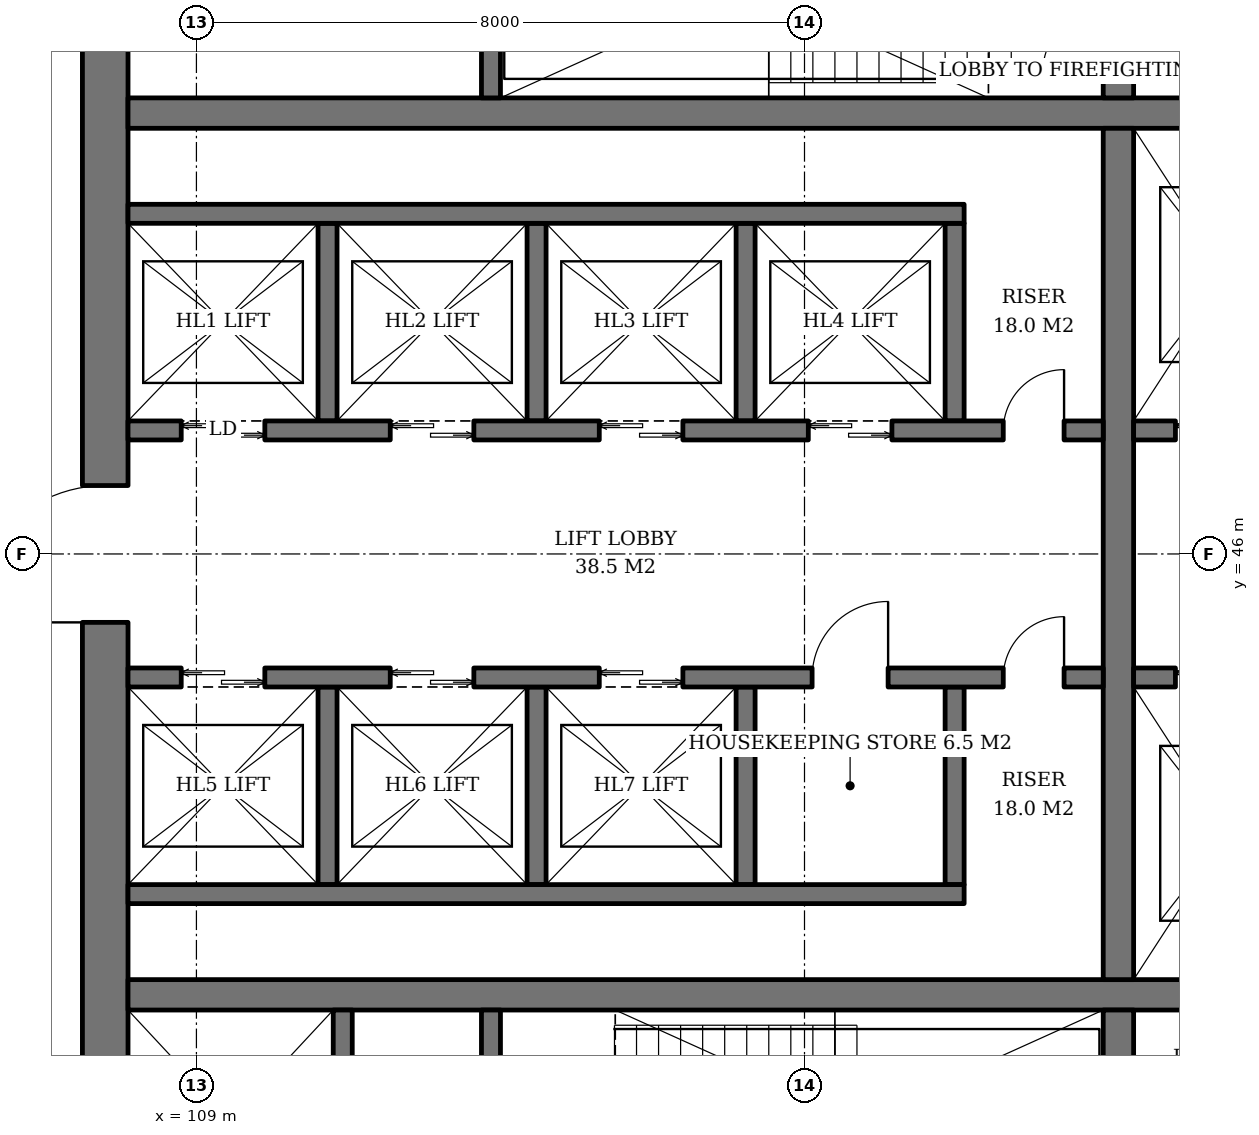
"""IFC4 building model, lengths in metres.
Left out: names, types, materials, properties, quantities, classifications, styles, units other than length and angle.
Written with IfcOpenShell. Run it as: python <this file> out.ifc"""

import sys

from ifc_helpers import new_model, si_unit, direction, frame, frame_2d, origin, place, context, subcontext, project, spatial, rectangle, extrude, element, fill, save


model = new_model("IFC4")
c1 = context("Model", 3, precision=1e-05, world=origin(), true_north=direction((0.0, 1.0)))
c2 = subcontext(c1, "Body", "Model", "MODEL_VIEW")
j1 = project(units=[si_unit("LENGTHUNIT", "METRE"), si_unit("PLANEANGLEUNIT", "RADIAN")], contexts=[c1])
p1 = place(None, origin())
s1 = spatial("IfcSite", under=j1, at=p1, CompositionType="ELEMENT")
p2 = place(p1, origin())
s2 = spatial("IfcBuilding", under=s1, at=p2, CompositionType="ELEMENT")
p3 = place(p2, frame((0.0, 0.0, 89.4)))
s3 = spatial("IfcBuildingStorey", under=s2, at=p3, CompositionType="ELEMENT", Elevation=89.4)
p4 = place(p3, frame((107.8, 37.1, 0.0), z_axis=(0.0, 0.0, 1.0), x_axis=(0.0, 1.0, 0.0)))
e1 = element("IfcWall", 1, at=p4, inside=s3, PredefinedType="SHEAR", context=c2, shape_type="SweptSolid", body=[
    extrude(rectangle(XDim=17.8, YDim=0.6, at=frame_2d((8.9, 0.0))), origin(), (0.0, 0.0, 1.0), 3.8),
])
p5 = place(p4, frame((8.0, 0.0, 0.0)))
e2 = element("IfcOpeningElement", 2, at=p5, cuts=e1, PredefinedType="OPENING", context=c2, shape_type="SweptSolid", body=[
    extrude(rectangle(XDim=1.8, YDim=2.4, at=frame_2d((0.9, 1.2))), frame((0.0, 0.31, 0.0), z_axis=(0.0, -1.0, 0.0), x_axis=(1.0, 0.0, 0.0)), (0.0, 0.0, 1.0), 0.62),
])
for number, where, z_axis, x_axis in (
    (3, (108.1, 40.2, 0.0), (0.0, 0.0, 1.0), (1.0, 0.0, 0.0)),
    (4, (108.1, 51.8, 0.0), (0.0, 0.0, 1.0), (1.0, 0.0, 0.0)),
):
    element("IfcWall", number, at=place(p3, frame(where, z_axis=z_axis, x_axis=x_axis)), inside=s3, PredefinedType="SHEAR", context=c2, shape_type="SweptSolid", body=[
        extrude(rectangle(XDim=17.8, YDim=0.4, at=frame_2d((8.9, 0.0))), origin(), (0.0, 0.0, 1.0), 3.8),
    ])
p6 = place(p3, frame((121.13, 37.1, 0.0), z_axis=(0.0, 0.0, 1.0), x_axis=(0.0, 1.0, 0.0)))
e5 = element("IfcWall", 5, at=p6, inside=s3, PredefinedType="SHEAR", context=c2, shape_type="SweptSolid", body=[
    extrude(rectangle(XDim=2.9, YDim=0.4, at=frame_2d((1.45, 0.0))), origin(), (0.0, 0.0, 1.0), 3.8),
])
p7 = place(p3, frame((121.13, 40.4, 0.0), z_axis=(0.0, 0.0, 1.0), x_axis=(0.0, 1.0, 0.0)))
e6 = element("IfcWall", 6, at=p7, inside=s3, PredefinedType="SHEAR", context=c2, shape_type="SweptSolid", body=[
    extrude(rectangle(XDim=11.2, YDim=0.4, at=frame_2d((5.6, 0.0))), origin(), (0.0, 0.0, 1.0), 3.8),
])
p8 = place(p3, frame((121.13, 52.0, 0.0), z_axis=(0.0, 0.0, 1.0), x_axis=(0.0, 1.0, 0.0)))
e7 = element("IfcWall", 7, at=p8, inside=s3, PredefinedType="SHEAR", context=c2, shape_type="SweptSolid", body=[
    extrude(rectangle(XDim=2.9, YDim=0.4, at=frame_2d((1.45, 0.0))), origin(), (0.0, 0.0, 1.0), 3.8),
])
p9 = place(p8, frame((0.3, 0.0, 0.0)))
e8 = element("IfcOpeningElement", 8, at=p9, cuts=e7, PredefinedType="OPENING", context=c2, shape_type="SweptSolid", body=[
    extrude(rectangle(XDim=1.0, YDim=2.1, at=frame_2d((0.5, 1.05))), frame((0.0, 0.21, 0.0), z_axis=(0.0, -1.0, 0.0), x_axis=(1.0, 0.0, 0.0)), (0.0, 0.0, 1.0), 0.42),
])
p10 = place(p3, frame((110.925, 37.1, 0.0), z_axis=(0.0, 0.0, 1.0), x_axis=(0.0, 1.0, 0.0)))
e9 = element("IfcWall", 9, at=p10, inside=s3, PredefinedType="SHEAR", context=c2, shape_type="SweptSolid", body=[
    extrude(rectangle(XDim=2.9, YDim=0.25, at=frame_2d((1.45, 0.0))), origin(), (0.0, 0.0, 1.0), 3.8),
])
p11 = place(p10, frame((0.8, 0.0, 0.0)))
e10 = element("IfcOpeningElement", 10, at=p11, cuts=e9, PredefinedType="OPENING", context=c2, shape_type="SweptSolid", body=[
    extrude(rectangle(XDim=1.3, YDim=2.2, at=frame_2d((0.65, 1.1))), frame((0.0, 0.135, 0.0), z_axis=(0.0, -1.0, 0.0), x_axis=(1.0, 0.0, 0.0)), (0.0, 0.0, 1.0), 0.27),
])
p12 = place(p3, frame((112.875, 37.1, 0.0), z_axis=(0.0, 0.0, 1.0), x_axis=(0.0, 1.0, 0.0)))
e11 = element("IfcWall", 11, at=p12, inside=s3, PredefinedType="SHEAR", context=c2, shape_type="SweptSolid", body=[
    extrude(rectangle(XDim=2.9, YDim=0.25, at=frame_2d((1.45, 0.0))), origin(), (0.0, 0.0, 1.0), 3.8),
])
p13 = place(p12, frame((0.75, 0.0, 0.0)))
e12 = element("IfcOpeningElement", 12, at=p13, cuts=e11, PredefinedType="OPENING", context=c2, shape_type="SweptSolid", body=[
    extrude(rectangle(XDim=1.2, YDim=2.1, at=frame_2d((0.6, 1.05))), frame((0.0, 0.135, 0.0), z_axis=(0.0, -1.0, 0.0), x_axis=(1.0, 0.0, 0.0)), (0.0, 0.0, 1.0), 0.27),
])
p14 = place(p3, frame((112.875, 52.0, 0.0), z_axis=(0.0, 0.0, 1.0), x_axis=(0.0, 1.0, 0.0)))
e13 = element("IfcWall", 13, at=p14, inside=s3, PredefinedType="SHEAR", context=c2, shape_type="SweptSolid", body=[
    extrude(rectangle(XDim=2.9, YDim=0.25, at=frame_2d((1.45, 0.0))), origin(), (0.0, 0.0, 1.0), 3.8),
])
for number, where, z_axis, x_axis in (
    (14, (110.725, 47.75, 0.0), (0.0, 0.0, 1.0), (0.0, 1.0, 0.0)),
    (15, (113.475, 47.75, 0.0), (0.0, 0.0, 1.0), (0.0, 1.0, 0.0)),
    (16, (116.225, 47.75, 0.0), (0.0, 0.0, 1.0), (0.0, 1.0, 0.0)),
    (17, (118.975, 47.75, 0.0), (0.0, 0.0, 1.0), (0.0, 1.0, 0.0)),
):
    element("IfcWall", number, at=place(p3, frame(where, z_axis=z_axis, x_axis=x_axis)), inside=s3, PredefinedType="SHEAR", context=c2, shape_type="SweptSolid", body=[
        extrude(rectangle(XDim=2.6, YDim=0.25, at=frame_2d((1.3, 0.0))), origin(), (0.0, 0.0, 1.0), 3.8),
    ])
p15 = place(p3, frame((108.1, 50.475, 0.0), z_axis=(0.0, 0.0, 1.0), x_axis=(1.0, 0.0, 0.0)))
e18 = element("IfcWall", 18, at=p15, inside=s3, PredefinedType="SHEAR", context=c2, shape_type="SweptSolid", body=[
    extrude(rectangle(XDim=11.0, YDim=0.25, at=frame_2d((5.5, 0.0))), origin(), (0.0, 0.0, 1.0), 3.8),
])
p16 = place(p3, frame((108.1, 47.625, 0.0), z_axis=(0.0, 0.0, 1.0), x_axis=(1.0, 0.0, 0.0)))
e19 = element("IfcWall", 19, at=p16, inside=s3, PredefinedType="SHEAR", context=c2, shape_type="SweptSolid", body=[
    extrude(rectangle(XDim=12.83, YDim=0.25, at=frame_2d((6.415, 0.0))), origin(), (0.0, 0.0, 1.0), 3.8),
])
p17 = place(p16, frame((0.7, 0.0, 0.0)))
e20 = element("IfcOpeningElement", 20, at=p17, cuts=e19, PredefinedType="OPENING", context=c2, shape_type="SweptSolid", body=[
    extrude(rectangle(XDim=1.1, YDim=2.2, at=frame_2d((0.55, 1.1))), frame((0.0, 0.135, 0.0), z_axis=(0.0, -1.0, 0.0), x_axis=(1.0, 0.0, 0.0)), (0.0, 0.0, 1.0), 0.27),
])
p18 = place(p16, frame((3.45, 0.0, 0.0)))
e21 = element("IfcOpeningElement", 21, at=p18, cuts=e19, PredefinedType="OPENING", context=c2, shape_type="SweptSolid", body=[
    extrude(rectangle(XDim=1.1, YDim=2.2, at=frame_2d((0.55, 1.1))), frame((0.0, 0.135, 0.0), z_axis=(0.0, -1.0, 0.0), x_axis=(1.0, 0.0, 0.0)), (0.0, 0.0, 1.0), 0.27),
])
p19 = place(p16, frame((6.2, 0.0, 0.0)))
e22 = element("IfcOpeningElement", 22, at=p19, cuts=e19, PredefinedType="OPENING", context=c2, shape_type="SweptSolid", body=[
    extrude(rectangle(XDim=1.1, YDim=2.2, at=frame_2d((0.55, 1.1))), frame((0.0, 0.135, 0.0), z_axis=(0.0, -1.0, 0.0), x_axis=(1.0, 0.0, 0.0)), (0.0, 0.0, 1.0), 0.27),
])
p20 = place(p16, frame((8.95, 0.0, 0.0)))
e23 = element("IfcOpeningElement", 23, at=p20, cuts=e19, PredefinedType="OPENING", context=c2, shape_type="SweptSolid", body=[
    extrude(rectangle(XDim=1.1, YDim=2.2, at=frame_2d((0.55, 1.1))), frame((0.0, 0.135, 0.0), z_axis=(0.0, -1.0, 0.0), x_axis=(1.0, 0.0, 0.0)), (0.0, 0.0, 1.0), 0.27),
])
p21 = place(p16, frame((11.515, 0.0, 0.0)))
e24 = element("IfcOpeningElement", 24, at=p21, cuts=e19, PredefinedType="OPENING", context=c2, shape_type="SweptSolid", body=[
    extrude(rectangle(XDim=0.8, YDim=2.0, at=frame_2d((0.4, 1.0))), frame((0.0, 0.135, 0.0), z_axis=(0.0, -1.0, 0.0), x_axis=(1.0, 0.0, 0.0)), (0.0, 0.0, 1.0), 0.27),
])
for number, where, z_axis, x_axis in (
    (25, (110.725, 44.25, 0.0), (0.0, 0.0, 1.0), (0.0, -1.0, 0.0)),
    (26, (113.475, 44.25, 0.0), (0.0, 0.0, 1.0), (0.0, -1.0, 0.0)),
    (27, (116.225, 44.25, 0.0), (0.0, 0.0, 1.0), (0.0, -1.0, 0.0)),
    (28, (118.975, 44.25, 0.0), (0.0, 0.0, 1.0), (0.0, -1.0, 0.0)),
):
    element("IfcWall", number, at=place(p3, frame(where, z_axis=z_axis, x_axis=x_axis)), inside=s3, PredefinedType="SHEAR", context=c2, shape_type="SweptSolid", body=[
        extrude(rectangle(XDim=2.6, YDim=0.25, at=frame_2d((1.3, 0.0))), origin(), (0.0, 0.0, 1.0), 3.8),
    ])
p22 = place(p3, frame((108.1, 41.525, 0.0), z_axis=(0.0, 0.0, 1.0), x_axis=(1.0, 0.0, 0.0)))
e29 = element("IfcWall", 29, at=p22, inside=s3, PredefinedType="SHEAR", context=c2, shape_type="SweptSolid", body=[
    extrude(rectangle(XDim=11.0, YDim=0.25, at=frame_2d((5.5, 0.0))), origin(), (0.0, 0.0, 1.0), 3.8),
])
p23 = place(p3, frame((108.1, 44.375, 0.0), z_axis=(0.0, 0.0, 1.0), x_axis=(1.0, 0.0, 0.0)))
e30 = element("IfcWall", 30, at=p23, inside=s3, PredefinedType="SHEAR", context=c2, shape_type="SweptSolid", body=[
    extrude(rectangle(XDim=12.83, YDim=0.25, at=frame_2d((6.415, 0.0))), origin(), (0.0, 0.0, 1.0), 3.8),
])
p24 = place(p23, frame((0.7, 0.0, 0.0)))
e31 = element("IfcOpeningElement", 31, at=p24, cuts=e30, PredefinedType="OPENING", context=c2, shape_type="SweptSolid", body=[
    extrude(rectangle(XDim=1.1, YDim=2.2, at=frame_2d((0.55, 1.1))), frame((0.0, 0.135, 0.0), z_axis=(0.0, -1.0, 0.0), x_axis=(1.0, 0.0, 0.0)), (0.0, 0.0, 1.0), 0.27),
])
p25 = place(p23, frame((3.45, 0.0, 0.0)))
e32 = element("IfcOpeningElement", 32, at=p25, cuts=e30, PredefinedType="OPENING", context=c2, shape_type="SweptSolid", body=[
    extrude(rectangle(XDim=1.1, YDim=2.2, at=frame_2d((0.55, 1.1))), frame((0.0, 0.135, 0.0), z_axis=(0.0, -1.0, 0.0), x_axis=(1.0, 0.0, 0.0)), (0.0, 0.0, 1.0), 0.27),
])
p26 = place(p23, frame((6.2, 0.0, 0.0)))
e33 = element("IfcOpeningElement", 33, at=p26, cuts=e30, PredefinedType="OPENING", context=c2, shape_type="SweptSolid", body=[
    extrude(rectangle(XDim=1.1, YDim=2.2, at=frame_2d((0.55, 1.1))), frame((0.0, 0.135, 0.0), z_axis=(0.0, -1.0, 0.0), x_axis=(1.0, 0.0, 0.0)), (0.0, 0.0, 1.0), 0.27),
])
p27 = place(p23, frame((9.0, 0.0, 0.0)))
e34 = element("IfcOpeningElement", 34, at=p27, cuts=e30, PredefinedType="OPENING", context=c2, shape_type="SweptSolid", body=[
    extrude(rectangle(XDim=1.0, YDim=2.1, at=frame_2d((0.5, 1.05))), frame((0.0, 0.135, 0.0), z_axis=(0.0, -1.0, 0.0), x_axis=(1.0, 0.0, 0.0)), (0.0, 0.0, 1.0), 0.27),
])
p28 = place(p23, frame((11.515, 0.0, 0.0)))
e35 = element("IfcOpeningElement", 35, at=p28, cuts=e30, PredefinedType="OPENING", context=c2, shape_type="SweptSolid", body=[
    extrude(rectangle(XDim=0.8, YDim=2.0, at=frame_2d((0.4, 1.0))), frame((0.0, 0.135, 0.0), z_axis=(0.0, -1.0, 0.0), x_axis=(1.0, 0.0, 0.0)), (0.0, 0.0, 1.0), 0.27),
])
p29 = place(p3, frame((121.33, 47.625, 0.0), z_axis=(0.0, 0.0, 1.0), x_axis=(1.0, 0.0, 0.0)))
e36 = element("IfcWall", 36, at=p29, inside=s3, PredefinedType="SHEAR", context=c2, shape_type="SweptSolid", body=[
    extrude(rectangle(XDim=4.57, YDim=0.25, at=frame_2d((2.285, 0.0))), origin(), (0.0, 0.0, 1.0), 3.8),
])
p30 = place(p29, frame((0.55, 0.0, 0.0)))
e37 = element("IfcOpeningElement", 37, at=p30, cuts=e36, PredefinedType="OPENING", context=c2, shape_type="SweptSolid", body=[
    extrude(rectangle(XDim=1.4, YDim=2.4, at=frame_2d((0.7, 1.2))), frame((0.0, 0.135, 0.0), z_axis=(0.0, -1.0, 0.0), x_axis=(1.0, 0.0, 0.0)), (0.0, 0.0, 1.0), 0.27),
])
p31 = place(p29, frame((3.26, 0.0, 0.0)))
e38 = element("IfcOpeningElement", 38, at=p31, cuts=e36, PredefinedType="OPENING", context=c2, shape_type="SweptSolid", body=[
    extrude(rectangle(XDim=0.8, YDim=2.0, at=frame_2d((0.4, 1.0))), frame((0.0, 0.135, 0.0), z_axis=(0.0, -1.0, 0.0), x_axis=(1.0, 0.0, 0.0)), (0.0, 0.0, 1.0), 0.27),
])
p32 = place(p3, frame((121.33, 44.375, 0.0), z_axis=(0.0, 0.0, 1.0), x_axis=(1.0, 0.0, 0.0)))
e39 = element("IfcWall", 39, at=p32, inside=s3, PredefinedType="SHEAR", context=c2, shape_type="SweptSolid", body=[
    extrude(rectangle(XDim=4.57, YDim=0.25, at=frame_2d((2.285, 0.0))), origin(), (0.0, 0.0, 1.0), 3.8),
])
p33 = place(p32, frame((0.55, 0.0, 0.0)))
e40 = element("IfcOpeningElement", 40, at=p33, cuts=e39, PredefinedType="OPENING", context=c2, shape_type="SweptSolid", body=[
    extrude(rectangle(XDim=1.4, YDim=2.4, at=frame_2d((0.7, 1.2))), frame((0.0, 0.135, 0.0), z_axis=(0.0, -1.0, 0.0), x_axis=(1.0, 0.0, 0.0)), (0.0, 0.0, 1.0), 0.27),
])
p34 = place(p32, frame((3.26, 0.0, 0.0)))
e41 = element("IfcOpeningElement", 41, at=p34, cuts=e39, PredefinedType="OPENING", context=c2, shape_type="SweptSolid", body=[
    extrude(rectangle(XDim=0.8, YDim=2.0, at=frame_2d((0.4, 1.0))), frame((0.0, 0.135, 0.0), z_axis=(0.0, -1.0, 0.0), x_axis=(1.0, 0.0, 0.0)), (0.0, 0.0, 1.0), 0.27),
])
p35 = place(p17, origin())
e42 = element("IfcDoor", 42, at=p35, inside=s3, OperationType="DOUBLE_DOOR_SLIDING", PredefinedType="DOOR", context=c2, shape_type="SweptSolid", body=[
    extrude(rectangle(XDim=1.1, YDim=2.2, at=frame_2d((0.55, 1.1))), frame((0.0, 0.025, 0.0), z_axis=(0.0, -1.0, 0.0), x_axis=(1.0, 0.0, 0.0)), (0.0, 0.0, 1.0), 0.05),
])
fill(e20, e42)
p36 = place(p18, origin())
e43 = element("IfcDoor", 43, at=p36, inside=s3, OperationType="DOUBLE_DOOR_SLIDING", PredefinedType="DOOR", context=c2, shape_type="SweptSolid", body=[
    extrude(rectangle(XDim=1.1, YDim=2.2, at=frame_2d((0.55, 1.1))), frame((0.0, 0.025, 0.0), z_axis=(0.0, -1.0, 0.0), x_axis=(1.0, 0.0, 0.0)), (0.0, 0.0, 1.0), 0.05),
])
fill(e21, e43)
p37 = place(p19, origin())
e44 = element("IfcDoor", 44, at=p37, inside=s3, OperationType="DOUBLE_DOOR_SLIDING", PredefinedType="DOOR", context=c2, shape_type="SweptSolid", body=[
    extrude(rectangle(XDim=1.1, YDim=2.2, at=frame_2d((0.55, 1.1))), frame((0.0, 0.025, 0.0), z_axis=(0.0, -1.0, 0.0), x_axis=(1.0, 0.0, 0.0)), (0.0, 0.0, 1.0), 0.05),
])
fill(e22, e44)
p38 = place(p20, origin())
e45 = element("IfcDoor", 45, at=p38, inside=s3, OperationType="DOUBLE_DOOR_SLIDING", PredefinedType="DOOR", context=c2, shape_type="SweptSolid", body=[
    extrude(rectangle(XDim=1.1, YDim=2.2, at=frame_2d((0.55, 1.1))), frame((0.0, 0.025, 0.0), z_axis=(0.0, -1.0, 0.0), x_axis=(1.0, 0.0, 0.0)), (0.0, 0.0, 1.0), 0.05),
])
fill(e23, e45)
p39 = place(p21, origin())
e46 = element("IfcDoor", 46, at=p39, inside=s3, OperationType="SINGLE_SWING_RIGHT", PredefinedType="DOOR", context=c2, shape_type="SweptSolid", body=[
    extrude(rectangle(XDim=0.8, YDim=2.0, at=frame_2d((0.4, 1.0))), frame((0.0, 0.025, 0.0), z_axis=(0.0, -1.0, 0.0), x_axis=(1.0, 0.0, 0.0)), (0.0, 0.0, 1.0), 0.05),
])
fill(e24, e46)
p40 = place(p24, origin())
e47 = element("IfcDoor", 47, at=p40, inside=s3, OperationType="DOUBLE_DOOR_SLIDING", PredefinedType="DOOR", context=c2, shape_type="SweptSolid", body=[
    extrude(rectangle(XDim=1.1, YDim=2.2, at=frame_2d((0.55, 1.1))), frame((0.0, 0.025, 0.0), z_axis=(0.0, -1.0, 0.0), x_axis=(1.0, 0.0, 0.0)), (0.0, 0.0, 1.0), 0.05),
])
fill(e31, e47)
p41 = place(p25, origin())
e48 = element("IfcDoor", 48, at=p41, inside=s3, OperationType="DOUBLE_DOOR_SLIDING", PredefinedType="DOOR", context=c2, shape_type="SweptSolid", body=[
    extrude(rectangle(XDim=1.1, YDim=2.2, at=frame_2d((0.55, 1.1))), frame((0.0, 0.025, 0.0), z_axis=(0.0, -1.0, 0.0), x_axis=(1.0, 0.0, 0.0)), (0.0, 0.0, 1.0), 0.05),
])
fill(e32, e48)
p42 = place(p26, origin())
e49 = element("IfcDoor", 49, at=p42, inside=s3, OperationType="DOUBLE_DOOR_SLIDING", PredefinedType="DOOR", context=c2, shape_type="SweptSolid", body=[
    extrude(rectangle(XDim=1.1, YDim=2.2, at=frame_2d((0.55, 1.1))), frame((0.0, 0.025, 0.0), z_axis=(0.0, -1.0, 0.0), x_axis=(1.0, 0.0, 0.0)), (0.0, 0.0, 1.0), 0.05),
])
fill(e33, e49)
p43 = place(p27, origin())
e50 = element("IfcDoor", 50, at=p43, inside=s3, OperationType="SINGLE_SWING_RIGHT", PredefinedType="DOOR", context=c2, shape_type="SweptSolid", body=[
    extrude(rectangle(XDim=1.0, YDim=2.1, at=frame_2d((0.5, 1.05))), frame((0.0, 0.025, 0.0), z_axis=(0.0, -1.0, 0.0), x_axis=(1.0, 0.0, 0.0)), (0.0, 0.0, 1.0), 0.05),
])
fill(e34, e50)
p44 = place(p28, origin())
e51 = element("IfcDoor", 51, at=p44, inside=s3, OperationType="SINGLE_SWING_RIGHT", PredefinedType="DOOR", context=c2, shape_type="SweptSolid", body=[
    extrude(rectangle(XDim=0.8, YDim=2.0, at=frame_2d((0.4, 1.0))), frame((0.0, 0.025, 0.0), z_axis=(0.0, -1.0, 0.0), x_axis=(1.0, 0.0, 0.0)), (0.0, 0.0, 1.0), 0.05),
])
fill(e35, e51)
p45 = place(p30, origin())
e52 = element("IfcDoor", 52, at=p45, inside=s3, OperationType="DOUBLE_DOOR_SLIDING", PredefinedType="DOOR", context=c2, shape_type="SweptSolid", body=[
    extrude(rectangle(XDim=1.4, YDim=2.4, at=frame_2d((0.7, 1.2))), frame((0.0, 0.025, 0.0), z_axis=(0.0, -1.0, 0.0), x_axis=(1.0, 0.0, 0.0)), (0.0, 0.0, 1.0), 0.05),
])
fill(e37, e52)
p46 = place(p33, origin())
e53 = element("IfcDoor", 53, at=p46, inside=s3, OperationType="DOUBLE_DOOR_SLIDING", PredefinedType="DOOR", context=c2, shape_type="SweptSolid", body=[
    extrude(rectangle(XDim=1.4, YDim=2.4, at=frame_2d((0.7, 1.2))), frame((0.0, 0.025, 0.0), z_axis=(0.0, -1.0, 0.0), x_axis=(1.0, 0.0, 0.0)), (0.0, 0.0, 1.0), 0.05),
])
fill(e40, e53)
p47 = place(p9, origin())
e54 = element("IfcDoor", 54, at=p47, inside=s3, OperationType="SINGLE_SWING_LEFT", PredefinedType="DOOR", context=c2, shape_type="SweptSolid", body=[
    extrude(rectangle(XDim=1.0, YDim=2.1, at=frame_2d((0.5, 1.05))), frame((0.0, 0.025, 0.0), z_axis=(0.0, -1.0, 0.0), x_axis=(1.0, 0.0, 0.0)), (0.0, 0.0, 1.0), 0.05),
])
fill(e8, e54)
p48 = place(p5, origin())
e55 = element("IfcDoor", 55, at=p48, inside=s3, OperationType="DOUBLE_DOOR_SINGLE_SWING", PredefinedType="DOOR", context=c2, shape_type="SweptSolid", body=[
    extrude(rectangle(XDim=1.8, YDim=2.4, at=frame_2d((0.9, 1.2))), frame((0.0, 0.025, 0.0), z_axis=(0.0, -1.0, 0.0), x_axis=(1.0, 0.0, 0.0)), (0.0, 0.0, 1.0), 0.05),
])
fill(e2, e55)
save(model, sys.argv[1])
